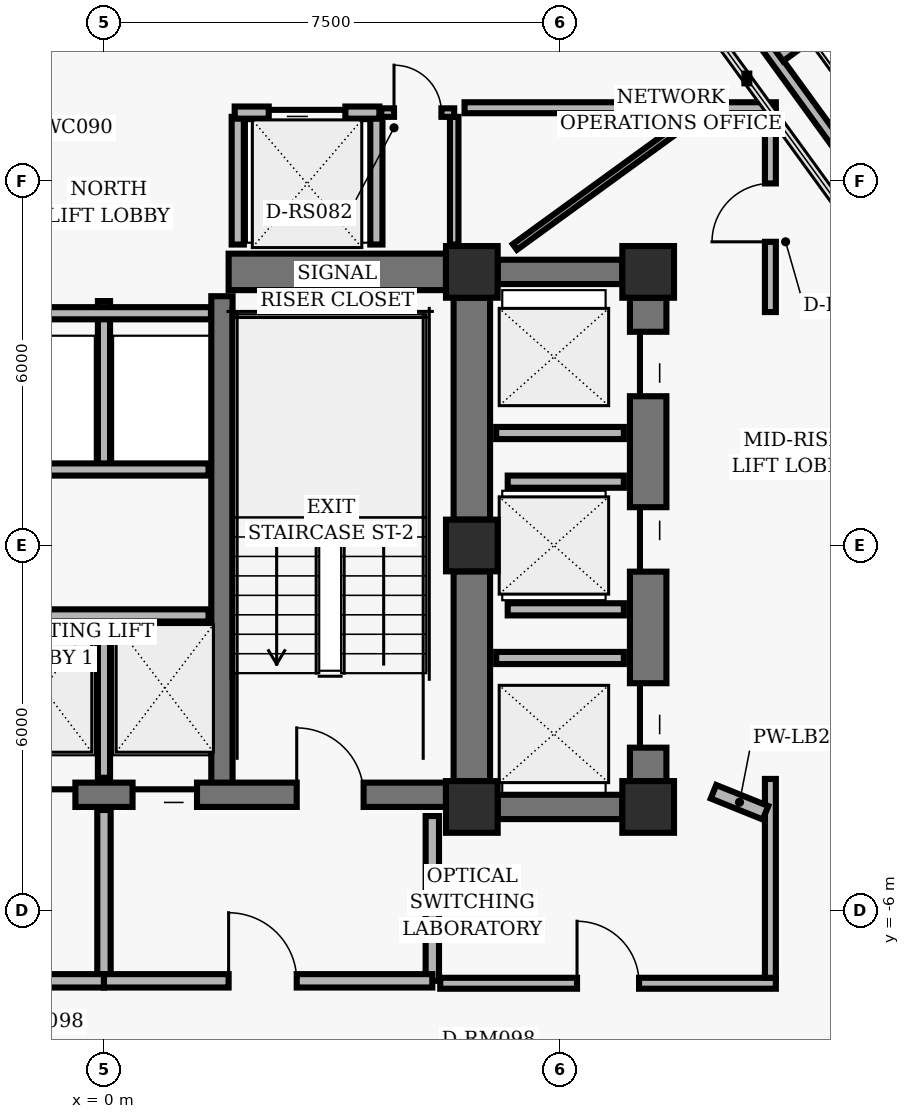
"""IFC4 building model, lengths in metres.
Left out: names, types, materials, properties, quantities, classifications, styles, units other than length and angle.
Written with IfcOpenShell. Run it as: python <this file> out.ifc"""

import sys

from ifc_helpers import new_model, si_unit, direction, frame, frame_2d, origin, origin_2d, place, context, subcontext, project, spatial, rectangle, hollow_rectangle, extrude, element, fill, save


model = new_model("IFC4")
c1 = context("Model", 3, precision=1e-05, world=origin(), true_north=direction((0.0, 1.0)))
c2 = subcontext(c1, "Body", "Model", "MODEL_VIEW")
j1 = project(units=[si_unit("LENGTHUNIT", "METRE"), si_unit("PLANEANGLEUNIT", "RADIAN")], contexts=[c1])
p1 = place(None, origin())
s1 = spatial("IfcSite", under=j1, at=p1, CompositionType="ELEMENT")
p2 = place(p1, origin())
s2 = spatial("IfcBuilding", under=s1, at=p2, CompositionType="ELEMENT")
p3 = place(p2, frame((0.0, 0.0, 110.72)))
s3 = spatial("IfcBuildingStorey", under=s2, at=p3, CompositionType="ELEMENT", Elevation=110.72)
for number, where, z_axis, x_axis in (
    (1, (6.05, 4.5, 0.0), (0.0, 0.0, 1.0), (1.0, 0.0, 0.0)),
    (2, (6.05, 0.0, 0.0), (0.0, 0.0, 1.0), (1.0, 0.0, 0.0)),
    (3, (6.05, -4.3, 0.0), (0.0, 0.0, 1.0), (1.0, 0.0, 0.0)),
    (4, (8.95, 4.5, 0.0), (0.0, 0.0, 1.0), (1.0, 0.0, 0.0)),
    (5, (8.95, -4.3, 0.0), (0.0, 0.0, 1.0), (1.0, 0.0, 0.0)),
):
    element("IfcColumn", number, at=place(p3, frame(where, z_axis=z_axis, x_axis=x_axis)), inside=s3, PredefinedType="COLUMN", context=c2, shape_type="SweptSolid", body=[
        extrude(hollow_rectangle(XDim=0.85, YDim=0.85, WallThickness=0.055, InnerFilletRadius=0.02, OuterFilletRadius=0.04, at=origin_2d()), origin(), (0.0, 0.0, 1.0), 3.04),
    ])
p4 = place(p3, frame((6.05, 0.425, 0.0), z_axis=(0.0, 0.0, 1.0), x_axis=(0.0, 1.0, 0.0)))
e6 = element("IfcWall", 6, at=p4, inside=s3, PredefinedType="SHEAR", context=c2, shape_type="SweptSolid", body=[
    extrude(rectangle(XDim=3.65, YDim=0.6, at=frame_2d((1.825, 0.0))), origin(), (0.0, 0.0, 1.0), 2.788),
])
p5 = place(p3, frame((6.05, -3.875, 0.0), z_axis=(0.0, 0.0, 1.0), x_axis=(0.0, 1.0, 0.0)))
e7 = element("IfcWall", 7, at=p5, inside=s3, PredefinedType="SHEAR", context=c2, shape_type="SweptSolid", body=[
    extrude(rectangle(XDim=3.45, YDim=0.6, at=frame_2d((1.725, 0.0))), origin(), (0.0, 0.0, 1.0), 2.788),
])
p6 = place(p3, frame((1.94, -4.1, 0.0), z_axis=(0.0, 0.0, 1.0), x_axis=(0.0, 1.0, 0.0)))
e8 = element("IfcWall", 8, at=p6, inside=s3, PredefinedType="SHEAR", context=c2, shape_type="SweptSolid", body=[
    extrude(rectangle(XDim=8.2, YDim=0.35, at=frame_2d((4.1, 0.0))), origin(), (0.0, 0.0, 1.0), 2.788),
])
p7 = place(p3, frame((-5.625, -4.1, 0.0), z_axis=(0.0, 0.0, 1.0), x_axis=(1.0, 0.0, 0.0)))
e9 = element("IfcWall", 9, at=p7, inside=s3, PredefinedType="SHEAR", context=c2, shape_type="SweptSolid", body=[
    extrude(rectangle(XDim=11.25, YDim=0.4, at=frame_2d((5.625, 0.0))), origin(), (0.0, 0.0, 1.0), 2.788),
])
p8 = place(p7, frame((1.355, 0.0, 0.0)))
e10 = element("IfcOpeningElement", 10, at=p8, cuts=e9, PredefinedType="OPENING", context=c2, shape_type="SweptSolid", body=[
    extrude(rectangle(XDim=1.1, YDim=2.04, at=frame_2d((0.55, 1.02))), frame((0.0, 0.21, 0.0), z_axis=(0.0, -1.0, 0.0), x_axis=(1.0, 0.0, 0.0)), (0.0, 0.0, 1.0), 0.42),
])
p9 = place(p7, frame((8.795, 0.0, 0.0)))
e11 = element("IfcOpeningElement", 11, at=p9, cuts=e9, PredefinedType="OPENING", context=c2, shape_type="SweptSolid", body=[
    extrude(rectangle(XDim=1.1, YDim=2.04, at=frame_2d((0.55, 1.02))), frame((0.0, 0.21, 0.0), z_axis=(0.0, -1.0, 0.0), x_axis=(1.0, 0.0, 0.0)), (0.0, 0.0, 1.0), 0.42),
])
p10 = place(p7, frame((4.095, 0.0, 0.0)))
e12 = element("IfcOpeningElement", 12, at=p10, cuts=e9, PredefinedType="OPENING", context=c2, shape_type="SweptSolid", body=[
    extrude(rectangle(XDim=1.06, YDim=2.04, at=frame_2d((0.53, 1.02))), frame((0.0, 0.21, 0.0), z_axis=(0.0, -1.0, 0.0), x_axis=(1.0, 0.0, 0.0)), (0.0, 0.0, 1.0), 0.42),
])
p11 = place(p7, frame((6.095, 0.0, 0.0)))
e13 = element("IfcOpeningElement", 13, at=p11, cuts=e9, PredefinedType="OPENING", context=c2, shape_type="SweptSolid", body=[
    extrude(rectangle(XDim=1.06, YDim=2.04, at=frame_2d((0.53, 1.02))), frame((0.0, 0.21, 0.0), z_axis=(0.0, -1.0, 0.0), x_axis=(1.0, 0.0, 0.0)), (0.0, 0.0, 1.0), 0.42),
])
p12 = place(p3, frame((2.05, 4.5, 0.0), z_axis=(0.0, 0.0, 1.0), x_axis=(1.0, 0.0, 0.0)))
e14 = element("IfcWall", 14, at=p12, inside=s3, PredefinedType="SHEAR", context=c2, shape_type="SweptSolid", body=[
    extrude(rectangle(XDim=3.575, YDim=0.6, at=frame_2d((1.788, 0.0))), origin(), (0.0, 0.0, 1.0), 2.788),
])
p13 = place(p3, frame((8.95, -3.875, 0.0), z_axis=(0.0, 0.0, 1.0), x_axis=(0.0, 1.0, 0.0)))
e15 = element("IfcWall", 15, at=p13, inside=s3, PredefinedType="SHEAR", context=c2, shape_type="SweptSolid", body=[
    extrude(rectangle(XDim=7.95, YDim=0.6, at=frame_2d((3.975, 0.0))), origin(), (0.0, 0.0, 1.0), 2.788),
])
p14 = place(p13, frame((0.55, 0.0, 0.0)))
e16 = element("IfcOpeningElement", 16, at=p14, cuts=e15, PredefinedType="OPENING", context=c2, shape_type="SweptSolid", body=[
    extrude(rectangle(XDim=1.06, YDim=2.04, at=frame_2d((0.53, 1.02))), frame((0.0, 0.31, 0.0), z_axis=(0.0, -1.0, 0.0), x_axis=(1.0, 0.0, 0.0)), (0.0, 0.0, 1.0), 0.62),
])
p15 = place(p13, frame((3.445, 0.0, 0.0)))
e17 = element("IfcOpeningElement", 17, at=p15, cuts=e15, PredefinedType="OPENING", context=c2, shape_type="SweptSolid", body=[
    extrude(rectangle(XDim=1.06, YDim=2.04, at=frame_2d((0.53, 1.02))), frame((0.0, 0.31, 0.0), z_axis=(0.0, -1.0, 0.0), x_axis=(1.0, 0.0, 0.0)), (0.0, 0.0, 1.0), 0.62),
])
p16 = place(p13, frame((6.33, 0.0, 0.0)))
e18 = element("IfcOpeningElement", 18, at=p16, cuts=e15, PredefinedType="OPENING", context=c2, shape_type="SweptSolid", body=[
    extrude(rectangle(XDim=1.06, YDim=2.04, at=frame_2d((0.53, 1.02))), frame((0.0, 0.31, 0.0), z_axis=(0.0, -1.0, 0.0), x_axis=(1.0, 0.0, 0.0)), (0.0, 0.0, 1.0), 0.62),
])
for number, where, z_axis, x_axis in (
    (19, (6.475, 4.5, 0.0), (0.0, 0.0, 1.0), (1.0, 0.0, 0.0)),
    (20, (6.475, -4.3, 0.0), (0.0, 0.0, 1.0), (1.0, 0.0, 0.0)),
):
    element("IfcWall", number, at=place(p3, frame(where, z_axis=z_axis, x_axis=x_axis)), inside=s3, PredefinedType="SHEAR", context=c2, shape_type="SweptSolid", body=[
        extrude(rectangle(XDim=2.05, YDim=0.4, at=frame_2d((1.025, 0.0))), origin(), (0.0, 0.0, 1.0), 2.788),
    ])
p17 = place(p3, frame((0.0, -3.82, 0.0), z_axis=(0.0, 0.0, 1.0), x_axis=(0.0, 1.0, 0.0)))
e21 = element("IfcWall", 21, at=p17, inside=s3, PredefinedType="PARTITIONING", context=c2, shape_type="SweptSolid", body=[
    extrude(rectangle(XDim=2.67, YDim=0.2, at=frame_2d((1.335, 0.0))), origin(), (0.0, 0.0, 1.0), 2.763),
])
p18 = place(p3, frame((-1.72, -1.15, 0.0), z_axis=(0.0, 0.0, 1.0), x_axis=(1.0, 0.0, 0.0)))
e22 = element("IfcWall", 22, at=p18, inside=s3, PredefinedType="PARTITIONING", context=c2, shape_type="SweptSolid", body=[
    extrude(rectangle(XDim=3.44, YDim=0.2, at=frame_2d((1.72, 0.0))), origin(), (0.0, 0.0, 1.0), 2.763),
])
p19 = place(p3, frame((5.4, -7.16, 0.0), z_axis=(0.0, 0.0, 1.0), x_axis=(0.0, 1.0, 0.0)))
e23 = element("IfcWall", 23, at=p19, inside=s3, PredefinedType="PARTITIONING", context=c2, shape_type="SweptSolid", body=[
    extrude(rectangle(XDim=2.71, YDim=0.22, at=frame_2d((1.355, 0.0))), origin(), (0.0, 0.0, 1.0), 2.763),
])
p20 = place(p3, frame((0.0, -7.16, 0.0), z_axis=(0.0, 0.0, 1.0), x_axis=(0.0, 1.0, 0.0)))
e24 = element("IfcWall", 24, at=p20, inside=s3, PredefinedType="PARTITIONING", context=c2, shape_type="SweptSolid", body=[
    extrude(rectangle(XDim=2.81, YDim=0.22, at=frame_2d((1.405, 0.0))), origin(), (0.0, 0.0, 1.0), 2.763),
])
p21 = place(p3, frame((-5.4, -7.16, 0.0), z_axis=(0.0, 0.0, 1.0), x_axis=(1.0, 0.0, 0.0)))
e25 = element("IfcWall", 25, at=p21, inside=s3, PredefinedType="PARTITIONING", context=c2, shape_type="SweptSolid", body=[
    extrude(rectangle(XDim=5.4, YDim=0.22, at=frame_2d((2.7, 0.0))), origin(), (0.0, 0.0, 1.0), 2.33),
])
p22 = place(p21, frame((2.05, 0.0, 0.0)))
e26 = element("IfcOpeningElement", 26, at=p22, cuts=e25, PredefinedType="OPENING", context=c2, shape_type="SweptSolid", body=[
    extrude(rectangle(XDim=1.12, YDim=2.02, at=frame_2d((0.56, 1.01))), frame((0.0, 0.12, 0.0), z_axis=(0.0, -1.0, 0.0), x_axis=(1.0, 0.0, 0.0)), (0.0, 0.0, 1.0), 0.24),
])
p23 = place(p3, frame((0.0, -7.16, 0.0), z_axis=(0.0, 0.0, 1.0), x_axis=(1.0, 0.0, 0.0)))
e27 = element("IfcWall", 27, at=p23, inside=s3, PredefinedType="PARTITIONING", context=c2, shape_type="SweptSolid", body=[
    extrude(rectangle(XDim=5.4, YDim=0.22, at=frame_2d((2.7, 0.0))), origin(), (0.0, 0.0, 1.0), 2.33),
])
p24 = place(p23, frame((2.05, 0.0, 0.0)))
e28 = element("IfcOpeningElement", 28, at=p24, cuts=e27, PredefinedType="OPENING", context=c2, shape_type="SweptSolid", body=[
    extrude(rectangle(XDim=1.12, YDim=2.02, at=frame_2d((0.56, 1.01))), frame((0.0, 0.12, 0.0), z_axis=(0.0, -1.0, 0.0), x_axis=(1.0, 0.0, 0.0)), (0.0, 0.0, 1.0), 0.24),
])
p25 = place(p3, frame((0.0, 1.25, 0.0), z_axis=(0.0, 0.0, 1.0), x_axis=(0.0, 1.0, 0.0)))
e29 = element("IfcWall", 29, at=p25, inside=s3, PredefinedType="PARTITIONING", context=c2, shape_type="SweptSolid", body=[
    extrude(rectangle(XDim=2.77, YDim=0.2, at=frame_2d((1.385, 0.0))), origin(), (0.0, 0.0, 1.0), 2.763),
])
p26 = place(p3, frame((-1.72, 1.25, 0.0), z_axis=(0.0, 0.0, 1.0), x_axis=(1.0, 0.0, 0.0)))
e30 = element("IfcWall", 30, at=p26, inside=s3, PredefinedType="PARTITIONING", context=c2, shape_type="SweptSolid", body=[
    extrude(rectangle(XDim=3.44, YDim=0.2, at=frame_2d((1.72, 0.0))), origin(), (0.0, 0.0, 1.0), 2.763),
])
p27 = place(p3, frame((-1.76, 3.82, 0.0), z_axis=(0.0, 0.0, 1.0), x_axis=(1.0, 0.0, 0.0)))
e31 = element("IfcWall", 31, at=p27, inside=s3, PredefinedType="PARTITIONING", context=c2, shape_type="SweptSolid", body=[
    extrude(rectangle(XDim=3.52, YDim=0.2, at=frame_2d((1.76, 0.0))), origin(), (0.0, 0.0, 1.0), 2.763),
])
p28 = place(p3, frame((2.2, 4.95, 0.0), z_axis=(0.0, 0.0, 1.0), x_axis=(0.0, 1.0, 0.0)))
e32 = element("IfcWall", 32, at=p28, inside=s3, PredefinedType="PARTITIONING", context=c2, shape_type="SweptSolid", body=[
    extrude(rectangle(XDim=2.1, YDim=0.2, at=frame_2d((1.05, 0.0))), origin(), (0.0, 0.0, 1.0), 2.132),
])
p29 = place(p3, frame((4.48, 4.95, 0.0), z_axis=(0.0, 0.0, 1.0), x_axis=(0.0, 1.0, 0.0)))
e33 = element("IfcWall", 33, at=p29, inside=s3, PredefinedType="PARTITIONING", context=c2, shape_type="SweptSolid", body=[
    extrude(rectangle(XDim=2.1, YDim=0.2, at=frame_2d((1.05, 0.0))), origin(), (0.0, 0.0, 1.0), 2.763),
])
p30 = place(p3, frame((2.15, 7.12, 0.0), z_axis=(0.0, 0.0, 1.0), x_axis=(1.0, 0.0, 0.0)))
e34 = element("IfcWall", 34, at=p30, inside=s3, PredefinedType="PARTITIONING", context=c2, shape_type="SweptSolid", body=[
    extrude(rectangle(XDim=2.38, YDim=0.2, at=frame_2d((1.19, 0.0))), origin(), (0.0, 0.0, 1.0), 2.763),
])
p31 = place(p30, frame((0.56, 0.0, 0.0)))
e35 = element("IfcOpeningElement", 35, at=p31, cuts=e34, PredefinedType="OPENING", context=c2, shape_type="SweptSolid", body=[
    extrude(rectangle(XDim=1.26, YDim=2.06, at=frame_2d((0.63, 1.03))), frame((0.0, 0.11, 0.0), z_axis=(0.0, -1.0, 0.0), x_axis=(1.0, 0.0, 0.0)), (0.0, 0.0, 1.0), 0.22),
])
p32 = place(p3, frame((5.76, 4.95, 0.0), z_axis=(0.0, 0.0, 1.0), x_axis=(0.0, 1.0, 0.0)))
e36 = element("IfcWall", 36, at=p32, inside=s3, PredefinedType="PARTITIONING", context=c2, shape_type="SweptSolid", body=[
    extrude(rectangle(XDim=2.1, YDim=0.14, at=frame_2d((1.05, 0.0))), origin(), (0.0, 0.0, 1.0), 2.132),
])
p33 = place(p3, frame((4.56, 7.12, 0.0), z_axis=(0.0, 0.0, 1.0), x_axis=(1.0, 0.0, 0.0)))
e37 = element("IfcWall", 37, at=p33, inside=s3, PredefinedType="PARTITIONING", context=c2, shape_type="SweptSolid", body=[
    extrude(rectangle(XDim=1.2, YDim=0.14, at=frame_2d((0.6, 0.0))), origin(), (0.0, 0.0, 1.0), 2.763),
])
p34 = place(p33, frame((0.21, 0.0, 0.0)))
e38 = element("IfcOpeningElement", 38, at=p34, cuts=e37, PredefinedType="OPENING", context=c2, shape_type="SweptSolid", body=[
    extrude(rectangle(XDim=0.78, YDim=2.01, at=frame_2d((0.39, 1.005))), frame((0.0, 0.08, 0.0), z_axis=(0.0, -1.0, 0.0), x_axis=(1.0, 0.0, 0.0)), (0.0, 0.0, 1.0), 0.16),
])
for number, where, z_axis, x_axis in (
    (39, (6.45, -1.85, 0.0), (0.0, 0.0, 1.0), (1.0, 0.0, 0.0)),
    (40, (6.45, 1.85, 0.0), (0.0, 0.0, 1.0), (1.0, 0.0, 0.0)),
):
    element("IfcWall", number, at=place(p3, frame(where, z_axis=z_axis, x_axis=x_axis)), inside=s3, PredefinedType="PARTITIONING", context=c2, shape_type="SweptSolid", body=[
        extrude(rectangle(XDim=2.1, YDim=0.2, at=frame_2d((1.05, 0.0))), origin(), (0.0, 0.0, 1.0), 2.763),
    ])
for number, where, z_axis, x_axis in (
    (41, (6.64, -1.05, 0.0), (0.0, 0.0, 1.0), (1.0, 0.0, 0.0)),
    (42, (6.64, 1.05, 0.0), (0.0, 0.0, 1.0), (1.0, 0.0, 0.0)),
):
    element("IfcWall", number, at=place(p3, frame(where, z_axis=z_axis, x_axis=x_axis)), inside=s3, PredefinedType="PARTITIONING", context=c2, shape_type="SweptSolid", body=[
        extrude(rectangle(XDim=1.91, YDim=0.2, at=frame_2d((0.955, 0.0))), origin(), (0.0, 0.0, 1.0), 2.763),
    ])
p35 = place(p3, frame((10.263, 9.077, 0.0), z_axis=(0.0, 0.0, 1.0), x_axis=(0.587780951295, -0.809020119215, 0.0)))
e43 = element("IfcWall", 43, at=p35, inside=s3, PredefinedType="PARTITIONING", context=c2, shape_type="SweptSolid", body=[
    extrude(rectangle(XDim=7.469, YDim=0.18, at=frame_2d((3.734, 0.0))), origin(), (0.0, 0.0, 1.0), 2.763),
])
p36 = place(p3, frame((5.53, -7.2, 0.0), z_axis=(0.0, 0.0, 1.0), x_axis=(1.0, 0.0, 0.0)))
e44 = element("IfcWall", 44, at=p36, inside=s3, PredefinedType="PARTITIONING", context=c2, shape_type="SweptSolid", body=[
    extrude(rectangle(XDim=5.52, YDim=0.18, at=frame_2d((2.76, 0.0))), origin(), (0.0, 0.0, 1.0), 2.33),
])
p37 = place(p36, frame((2.25, 0.0, 0.0)))
e45 = element("IfcOpeningElement", 45, at=p37, cuts=e44, PredefinedType="OPENING", context=c2, shape_type="SweptSolid", body=[
    extrude(rectangle(XDim=1.02, YDim=2.02, at=frame_2d((0.51, 1.01))), frame((0.0, 0.1, 0.0), z_axis=(0.0, -1.0, 0.0), x_axis=(1.0, 0.0, 0.0)), (0.0, 0.0, 1.0), 0.2),
])
p38 = place(p3, frame((10.96, -7.11, 0.0), z_axis=(0.0, 0.0, 1.0), x_axis=(0.0, 1.0, 0.0)))
e46 = element("IfcWall", 46, at=p38, inside=s3, PredefinedType="PARTITIONING", context=c2, shape_type="SweptSolid", body=[
    extrude(rectangle(XDim=3.271, YDim=0.18, at=frame_2d((1.635, 0.0))), origin(), (0.0, 0.0, 1.0), 2.763),
])
p39 = place(p3, frame((10.96, 3.84, 0.0), z_axis=(0.0, 0.0, 1.0), x_axis=(0.0, 1.0, 0.0)))
e47 = element("IfcWall", 47, at=p39, inside=s3, PredefinedType="PARTITIONING", context=c2, shape_type="SweptSolid", body=[
    extrude(rectangle(XDim=3.271, YDim=0.18, at=frame_2d((1.635, 0.0))), origin(), (0.0, 0.0, 1.0), 2.763),
])
p40 = place(p39, frame((1.155, 0.0, 0.0)))
e48 = element("IfcOpeningElement", 48, at=p40, cuts=e47, PredefinedType="OPENING", context=c2, shape_type="SweptSolid", body=[
    extrude(rectangle(XDim=0.96, YDim=2.02, at=frame_2d((0.48, 1.01))), frame((0.0, 0.1, 0.0), z_axis=(0.0, -1.0, 0.0), x_axis=(1.0, 0.0, 0.0)), (0.0, 0.0, 1.0), 0.2),
])
p41 = place(p3, frame((11.05, 7.2, 0.0), z_axis=(0.0, 0.0, 1.0), x_axis=(-1.0, 0.0, 0.0)))
e49 = element("IfcWall", 49, at=p41, inside=s3, PredefinedType="PARTITIONING", context=c2, shape_type="SweptSolid", body=[
    extrude(rectangle(XDim=5.12, YDim=0.18, at=frame_2d((2.56, 0.0))), origin(), (0.0, 0.0, 1.0), 2.763),
])
p42 = place(p3, frame((10.024, -4.05, 0.0), z_axis=(0.0, 0.0, 1.0), x_axis=(0.927194137639, -0.374581140912, 0.0)))
e50 = element("IfcWall", 50, at=p42, inside=s3, PredefinedType="PARTITIONING", context=c2, shape_type="SweptSolid", body=[
    extrude(rectangle(XDim=0.923, YDim=0.24, at=frame_2d((0.461, 0.0))), origin(), (0.0, 0.0, 1.0), 2.763),
])
p43 = place(p3, frame((6.758, 4.91, 0.0), z_axis=(0.0, 0.0, 1.0), x_axis=(0.808985911181, 0.58782803226, 0.0)))
e51 = element("IfcWall", 51, at=p43, inside=s3, PredefinedType="MOVABLE", context=c2, shape_type="SweptSolid", body=[
    extrude(rectangle(XDim=3.76, YDim=0.115, at=frame_2d((1.88, 0.0))), origin(), (0.0, 0.0, 1.0), 2.763),
])
p44 = place(p3, frame((11.098, 8.063, 0.0), z_axis=(0.0, 0.0, 1.0), x_axis=(0.809093866449, 0.587679432408, 0.0)))
e52 = element("IfcWall", 52, at=p44, inside=s3, PredefinedType="PARTITIONING", context=c2, shape_type="SweptSolid", body=[
    extrude(rectangle(XDim=0.59, YDim=0.24, at=frame_2d((0.295, 0.0))), origin(), (0.0, 0.0, 1.0), 2.763),
])
p45 = place(p9, origin())
e53 = element("IfcDoor", 53, at=p45, inside=s3, OperationType="SINGLE_SWING_LEFT", PredefinedType="DOOR", context=c2, shape_type="SweptSolid", body=[
    extrude(rectangle(XDim=1.1, YDim=2.04, at=frame_2d((0.55, 1.02))), frame((0.0, 0.025, 0.0), z_axis=(0.0, -1.0, 0.0), x_axis=(1.0, 0.0, 0.0)), (0.0, 0.0, 1.0), 0.05),
])
fill(e11, e53)
p46 = place(p10, origin())
e54 = element("IfcDoor", 54, at=p46, inside=s3, OperationType="SLIDING_TO_LEFT", PredefinedType="DOOR", context=c2, shape_type="SweptSolid", body=[
    extrude(rectangle(XDim=1.06, YDim=2.04, at=frame_2d((0.53, 1.02))), frame((0.0, 0.025, 0.0), z_axis=(0.0, -1.0, 0.0), x_axis=(1.0, 0.0, 0.0)), (0.0, 0.0, 1.0), 0.05),
])
fill(e12, e54)
p47 = place(p11, origin())
e55 = element("IfcDoor", 55, at=p47, inside=s3, OperationType="SLIDING_TO_RIGHT", PredefinedType="DOOR", context=c2, shape_type="SweptSolid", body=[
    extrude(rectangle(XDim=1.06, YDim=2.04, at=frame_2d((0.53, 1.02))), frame((0.0, 0.025, 0.0), z_axis=(0.0, -1.0, 0.0), x_axis=(1.0, 0.0, 0.0)), (0.0, 0.0, 1.0), 0.05),
])
fill(e13, e55)
p48 = place(p24, origin())
e56 = element("IfcDoor", 56, at=p48, inside=s3, OperationType="SINGLE_SWING_LEFT", PredefinedType="DOOR", context=c2, shape_type="SweptSolid", body=[
    extrude(rectangle(XDim=1.12, YDim=2.02, at=frame_2d((0.56, 1.01))), frame((0.0, 0.025, 0.0), z_axis=(0.0, -1.0, 0.0), x_axis=(1.0, 0.0, 0.0)), (0.0, 0.0, 1.0), 0.05),
])
fill(e28, e56)
p49 = place(p31, origin())
e57 = element("IfcDoor", 57, at=p49, inside=s3, OperationType="SLIDING_TO_LEFT", PredefinedType="DOOR", context=c2, shape_type="SweptSolid", body=[
    extrude(rectangle(XDim=1.26, YDim=2.06, at=frame_2d((0.63, 1.03))), frame((0.0, 0.025, 0.0), z_axis=(0.0, -1.0, 0.0), x_axis=(1.0, 0.0, 0.0)), (0.0, 0.0, 1.0), 0.05),
])
fill(e35, e57)
p50 = place(p34, origin())
e58 = element("IfcDoor", 58, at=p50, inside=s3, OperationType="SINGLE_SWING_LEFT", PredefinedType="DOOR", context=c2, shape_type="SweptSolid", body=[
    extrude(rectangle(XDim=0.78, YDim=2.01, at=frame_2d((0.39, 1.005))), frame((0.0, 0.025, 0.0), z_axis=(0.0, -1.0, 0.0), x_axis=(1.0, 0.0, 0.0)), (0.0, 0.0, 1.0), 0.05),
])
fill(e38, e58)
p51 = place(p14, origin())
e59 = element("IfcDoor", 59, at=p51, inside=s3, OperationType="SLIDING_TO_LEFT", PredefinedType="DOOR", context=c2, shape_type="SweptSolid", body=[
    extrude(rectangle(XDim=1.06, YDim=2.04, at=frame_2d((0.53, 1.02))), frame((0.0, 0.025, 0.0), z_axis=(0.0, -1.0, 0.0), x_axis=(1.0, 0.0, 0.0)), (0.0, 0.0, 1.0), 0.05),
])
fill(e16, e59)
p52 = place(p15, origin())
e60 = element("IfcDoor", 60, at=p52, inside=s3, OperationType="SLIDING_TO_RIGHT", PredefinedType="DOOR", context=c2, shape_type="SweptSolid", body=[
    extrude(rectangle(XDim=1.06, YDim=2.04, at=frame_2d((0.53, 1.02))), frame((0.0, 0.025, 0.0), z_axis=(0.0, -1.0, 0.0), x_axis=(1.0, 0.0, 0.0)), (0.0, 0.0, 1.0), 0.05),
])
fill(e17, e60)
p53 = place(p16, origin())
e61 = element("IfcDoor", 61, at=p53, inside=s3, OperationType="SLIDING_TO_LEFT", PredefinedType="DOOR", context=c2, shape_type="SweptSolid", body=[
    extrude(rectangle(XDim=1.06, YDim=2.04, at=frame_2d((0.53, 1.02))), frame((0.0, 0.025, 0.0), z_axis=(0.0, -1.0, 0.0), x_axis=(1.0, 0.0, 0.0)), (0.0, 0.0, 1.0), 0.05),
])
fill(e18, e61)
p54 = place(p37, origin())
e62 = element("IfcDoor", 62, at=p54, inside=s3, OperationType="SINGLE_SWING_LEFT", PredefinedType="DOOR", context=c2, shape_type="SweptSolid", body=[
    extrude(rectangle(XDim=1.02, YDim=2.02, at=frame_2d((0.51, 1.01))), frame((0.0, 0.025, 0.0), z_axis=(0.0, -1.0, 0.0), x_axis=(1.0, 0.0, 0.0)), (0.0, 0.0, 1.0), 0.05),
])
fill(e45, e62)
p55 = place(p40, origin())
e63 = element("IfcDoor", 63, at=p55, inside=s3, OperationType="SINGLE_SWING_LEFT", PredefinedType="DOOR", context=c2, shape_type="SweptSolid", body=[
    extrude(rectangle(XDim=0.96, YDim=2.02, at=frame_2d((0.48, 1.01))), frame((0.0, 0.025, 0.0), z_axis=(0.0, -1.0, 0.0), x_axis=(1.0, 0.0, 0.0)), (0.0, 0.0, 1.0), 0.05),
])
fill(e48, e63)
save(model, sys.argv[1])
